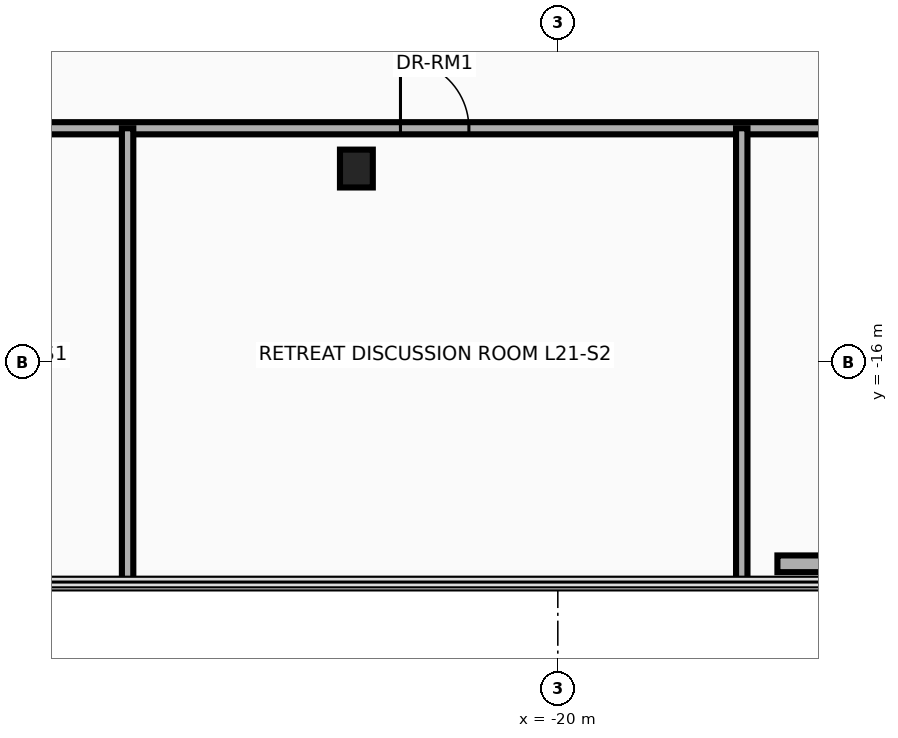
"""IFC4 building model, lengths in metres.
Left out: names, types, materials, properties, quantities, classifications, styles, units other than length and angle.
Written with IfcOpenShell. Run it as: python <this file> out.ifc"""

import sys

from ifc_helpers import new_model, si_unit, direction, frame, frame_2d, origin, origin_2d, place, context, subcontext, project, spatial, rectangle, i_section, extrude, source, transform, mapped, element, fill, save


model = new_model("IFC4")
c1 = context("Model", 3, precision=1e-05, world=origin(), true_north=direction((0.0, 1.0)))
c2 = subcontext(c1, "Body", "Model", "MODEL_VIEW")
j1 = project(units=[si_unit("LENGTHUNIT", "METRE"), si_unit("PLANEANGLEUNIT", "RADIAN")], contexts=[c1])
p1 = place(None, origin())
s1 = spatial("IfcSite", under=j1, at=p1, CompositionType="ELEMENT")
p2 = place(p1, origin())
s2 = spatial("IfcBuilding", under=s1, at=p2, CompositionType="ELEMENT")
p3 = place(p2, frame((0.0, 0.0, 85.2)))
s3 = spatial("IfcBuildingStorey", under=s2, at=p3, CompositionType="ELEMENT", Elevation=85.2)
m1 = source(origin(), c2, "Body", "SweptSolid", [
    extrude(i_section(OverallWidth=0.432, OverallDepth=0.498, WebThickness=0.056, FlangeThickness=0.089, at=origin_2d()), origin(), (0.0, 0.0, 1.0), 3.7),
])
p4 = place(p3, frame((-22.65, -13.45, 0.0), z_axis=(0.0, 0.0, 1.0), x_axis=(1.0, 0.0, 0.0)))
e1 = element("IfcColumn", 1, at=p4, inside=s3, PredefinedType="COLUMN", context=c2, shape_type="MappedRepresentation", body=[
    mapped(m1, transform((0.0, 0.0, 0.0), x_axis=(1.0, 0.0, 0.0), y_axis=(0.0, 1.0, 0.0), z_axis=(0.0, 0.0, 1.0), scale=1.0)),
])
p5 = place(p3, frame((-14.911, -18.65, 0.0), z_axis=(0.0, 0.0, 1.0), x_axis=(-1.0, 0.0, 0.0)))
e2 = element("IfcWall", 2, at=p5, inside=s3, PredefinedType="SOLIDWALL", context=c2, shape_type="SweptSolid", body=[
    extrude(rectangle(XDim=2.2, YDim=0.22, at=frame_2d((1.1, 0.0))), origin(), (0.0, 0.0, 1.0), 3.46),
])
p6 = place(p5, frame((0.65, 0.0, 0.95)))
e3 = element("IfcOpeningElement", 3, at=p6, cuts=e2, PredefinedType="OPENING", context=c2, shape_type="SweptSolid", body=[
    extrude(rectangle(XDim=0.9, YDim=1.3, at=frame_2d((0.45, 0.65))), frame((0.0, 0.125, 0.0), z_axis=(0.0, -1.0, 0.0), x_axis=(1.0, 0.0, 0.0)), (0.0, 0.0, 1.0), 0.25),
])
p7 = place(p3, frame((-31.89, -12.92, 0.0), z_axis=(0.0, 0.0, 1.0), x_axis=(1.0, 0.0, 0.0)))
e4 = element("IfcWall", 4, at=p7, inside=s3, PredefinedType="PARTITIONING", context=c2, shape_type="SweptSolid", body=[
    extrude(rectangle(XDim=22.28, YDim=0.16, at=frame_2d((11.14, 0.0))), origin(), (0.0, 0.0, 1.0), 2.834),
])
p8 = place(p7, frame((2.665, 0.0, 0.0)))
e5 = element("IfcOpeningElement", 5, at=p8, cuts=e4, PredefinedType="OPENING", context=c2, shape_type="SweptSolid", body=[
    extrude(rectangle(XDim=0.9, YDim=2.1, at=frame_2d((0.45, 1.05))), frame((0.0, 0.095, 0.0), z_axis=(0.0, -1.0, 0.0), x_axis=(1.0, 0.0, 0.0)), (0.0, 0.0, 1.0), 0.19),
])
p9 = place(p7, frame((9.82, 0.0, 0.0)))
e6 = element("IfcOpeningElement", 6, at=p9, cuts=e4, PredefinedType="OPENING", context=c2, shape_type="SweptSolid", body=[
    extrude(rectangle(XDim=0.9, YDim=2.1, at=frame_2d((0.45, 1.05))), frame((0.0, 0.095, 0.0), z_axis=(0.0, -1.0, 0.0), x_axis=(1.0, 0.0, 0.0)), (0.0, 0.0, 1.0), 0.19),
])
p10 = place(p7, frame((17.845, 0.0, 0.0)))
e7 = element("IfcOpeningElement", 7, at=p10, cuts=e4, PredefinedType="OPENING", context=c2, shape_type="SweptSolid", body=[
    extrude(rectangle(XDim=0.9, YDim=2.1, at=frame_2d((0.45, 1.05))), frame((0.0, 0.095, 0.0), z_axis=(0.0, -1.0, 0.0), x_axis=(1.0, 0.0, 0.0)), (0.0, 0.0, 1.0), 0.19),
])
p11 = place(p3, frame((-25.66, -18.89, 0.0), z_axis=(0.0, 0.0, 1.0), x_axis=(0.0, 1.0, 0.0)))
e8 = element("IfcWall", 8, at=p11, inside=s3, PredefinedType="PARTITIONING", context=c2, shape_type="SweptSolid", body=[
    extrude(rectangle(XDim=5.97, YDim=0.15, at=frame_2d((2.985, 0.0))), origin(), (0.0, 0.0, 1.0), 3.46),
])
p12 = place(p3, frame((-17.58, -18.89, 0.0), z_axis=(0.0, 0.0, 1.0), x_axis=(0.0, 1.0, 0.0)))
e9 = element("IfcWall", 9, at=p12, inside=s3, PredefinedType="PARTITIONING", context=c2, shape_type="SweptSolid", body=[
    extrude(rectangle(XDim=5.97, YDim=0.15, at=frame_2d((2.985, 0.0))), origin(), (0.0, 0.0, 1.0), 2.896),
])
p13 = place(p9, origin())
e10 = element("IfcDoor", 10, at=p13, inside=s3, OperationType="SINGLE_SWING_RIGHT", PredefinedType="DOOR", context=c2, shape_type="SweptSolid", body=[
    extrude(rectangle(XDim=0.9, YDim=2.1, at=frame_2d((0.45, 1.05))), frame((0.0, 0.025, 0.0), z_axis=(0.0, -1.0, 0.0), x_axis=(1.0, 0.0, 0.0)), (0.0, 0.0, 1.0), 0.05),
])
fill(e6, e10)
save(model, sys.argv[1])
